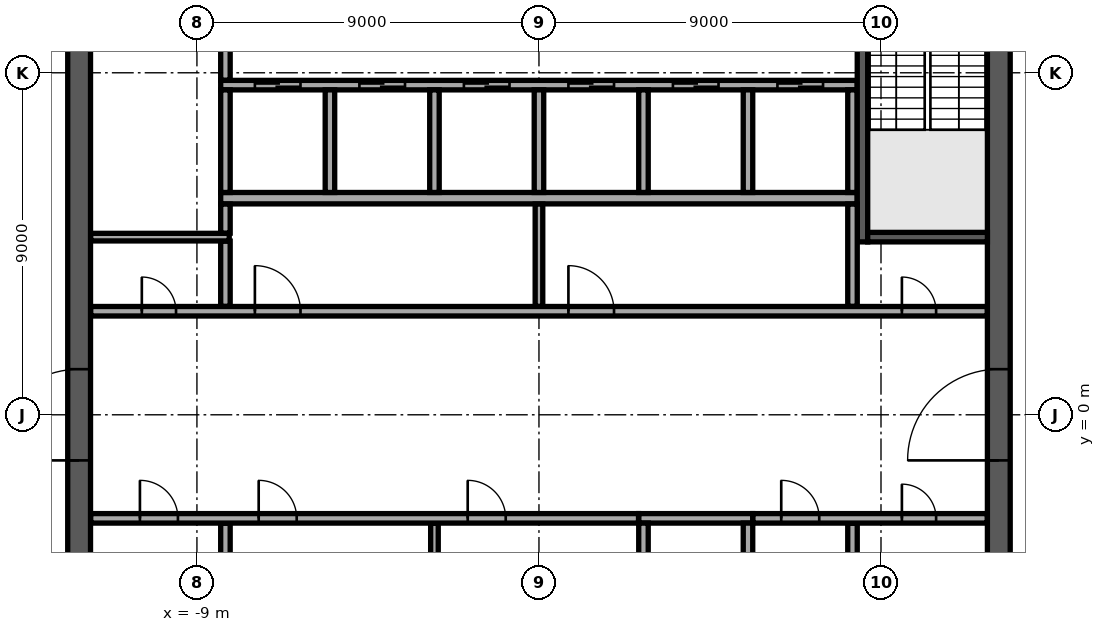
"""IFC4 building model, lengths in metres.
Left out: names, types, materials, properties, quantities, classifications, styles, units other than length and angle.
Written with IfcOpenShell. Run it as: python <this file> out.ifc"""

import sys

from ifc_helpers import new_model, si_unit, direction, frame, frame_2d, origin, place, context, subcontext, project, spatial, rectangle, extrude, element, fill, save


model = new_model("IFC4")
c1 = context("Model", 3, precision=1e-05, world=origin(), true_north=direction((0.0, 1.0)))
c2 = subcontext(c1, "Body", "Model", "MODEL_VIEW")
j1 = project(units=[si_unit("LENGTHUNIT", "METRE"), si_unit("PLANEANGLEUNIT", "RADIAN")], contexts=[c1])
p1 = place(None, origin())
s1 = spatial("IfcSite", under=j1, at=p1, CompositionType="ELEMENT")
p2 = place(p1, origin())
s2 = spatial("IfcBuilding", under=s1, at=p2, CompositionType="ELEMENT")
p3 = place(p2, frame((0.0, 0.0, 324.5)))
s3 = spatial("IfcBuildingStorey", under=s2, at=p3, CompositionType="ELEMENT", Elevation=324.5)
p4 = place(p3, frame((12.1, -11.8, 0.0), z_axis=(0.0, 0.0, 1.0), x_axis=(0.0, 1.0, 0.0)))
e1 = element("IfcWall", 1, at=p4, inside=s3, PredefinedType="SHEAR", context=c2, shape_type="SweptSolid", body=[
    extrude(rectangle(XDim=23.6, YDim=0.6, at=frame_2d((11.8, 0.0))), origin(), (0.0, 0.0, 1.0), 3.65),
])
p5 = place(p4, frame((10.6, 0.0, 0.0)))
e2 = element("IfcOpeningElement", 2, at=p5, cuts=e1, PredefinedType="OPENING", context=c2, shape_type="SweptSolid", body=[
    extrude(rectangle(XDim=2.4, YDim=2.4, at=frame_2d((1.2, 1.2))), frame((0.0, 0.31, 0.0), z_axis=(0.0, -1.0, 0.0), x_axis=(1.0, 0.0, 0.0)), (0.0, 0.0, 1.0), 0.62),
])
p6 = place(p3, frame((-12.1, -11.8, 0.0), z_axis=(0.0, 0.0, 1.0), x_axis=(0.0, 1.0, 0.0)))
e3 = element("IfcWall", 3, at=p6, inside=s3, PredefinedType="SHEAR", context=c2, shape_type="SweptSolid", body=[
    extrude(rectangle(XDim=23.6, YDim=0.6, at=frame_2d((11.8, 0.0))), origin(), (0.0, 0.0, 1.0), 3.65),
])
p7 = place(p6, frame((10.6, 0.0, 0.0)))
e4 = element("IfcOpeningElement", 4, at=p7, cuts=e3, PredefinedType="OPENING", context=c2, shape_type="SweptSolid", body=[
    extrude(rectangle(XDim=2.4, YDim=2.4, at=frame_2d((1.2, 1.2))), frame((0.0, 0.31, 0.0), z_axis=(0.0, -1.0, 0.0), x_axis=(1.0, 0.0, 0.0)), (0.0, 0.0, 1.0), 0.62),
])
p8 = place(p3, frame((-8.375, 5.7, 0.0), z_axis=(0.0, 0.0, 1.0), x_axis=(1.0, 0.0, 0.0)))
e5 = element("IfcWall", 5, at=p8, inside=s3, PredefinedType="SOLIDWALL", context=c2, shape_type="SweptSolid", body=[
    extrude(rectangle(XDim=16.75, YDim=0.3, at=frame_2d((8.375, 0.0))), origin(), (0.0, 0.0, 1.0), 3.65),
])
p9 = place(p3, frame((-8.375, 8.675, 0.0), z_axis=(0.0, 0.0, 1.0), x_axis=(1.0, 0.0, 0.0)))
e6 = element("IfcWall", 6, at=p9, inside=s3, PredefinedType="SOLIDWALL", context=c2, shape_type="SweptSolid", body=[
    extrude(rectangle(XDim=16.75, YDim=0.25, at=frame_2d((8.375, 0.0))), origin(), (0.0, 0.0, 1.0), 3.65),
])
p10 = place(p9, frame((0.9, 0.0, 0.0)))
e7 = element("IfcOpeningElement", 7, at=p10, cuts=e6, PredefinedType="OPENING", context=c2, shape_type="SweptSolid", body=[
    extrude(rectangle(XDim=1.2, YDim=2.1, at=frame_2d((0.6, 1.05))), frame((0.0, 0.135, 0.0), z_axis=(0.0, -1.0, 0.0), x_axis=(1.0, 0.0, 0.0)), (0.0, 0.0, 1.0), 0.27),
])
p11 = place(p9, frame((3.65, 0.0, 0.0)))
e8 = element("IfcOpeningElement", 8, at=p11, cuts=e6, PredefinedType="OPENING", context=c2, shape_type="SweptSolid", body=[
    extrude(rectangle(XDim=1.2, YDim=2.1, at=frame_2d((0.6, 1.05))), frame((0.0, 0.135, 0.0), z_axis=(0.0, -1.0, 0.0), x_axis=(1.0, 0.0, 0.0)), (0.0, 0.0, 1.0), 0.27),
])
p12 = place(p9, frame((6.4, 0.0, 0.0)))
e9 = element("IfcOpeningElement", 9, at=p12, cuts=e6, PredefinedType="OPENING", context=c2, shape_type="SweptSolid", body=[
    extrude(rectangle(XDim=1.2, YDim=2.1, at=frame_2d((0.6, 1.05))), frame((0.0, 0.135, 0.0), z_axis=(0.0, -1.0, 0.0), x_axis=(1.0, 0.0, 0.0)), (0.0, 0.0, 1.0), 0.27),
])
p13 = place(p9, frame((9.15, 0.0, 0.0)))
e10 = element("IfcOpeningElement", 10, at=p13, cuts=e6, PredefinedType="OPENING", context=c2, shape_type="SweptSolid", body=[
    extrude(rectangle(XDim=1.2, YDim=2.1, at=frame_2d((0.6, 1.05))), frame((0.0, 0.135, 0.0), z_axis=(0.0, -1.0, 0.0), x_axis=(1.0, 0.0, 0.0)), (0.0, 0.0, 1.0), 0.27),
])
p14 = place(p9, frame((11.9, 0.0, 0.0)))
e11 = element("IfcOpeningElement", 11, at=p14, cuts=e6, PredefinedType="OPENING", context=c2, shape_type="SweptSolid", body=[
    extrude(rectangle(XDim=1.2, YDim=2.1, at=frame_2d((0.6, 1.05))), frame((0.0, 0.135, 0.0), z_axis=(0.0, -1.0, 0.0), x_axis=(1.0, 0.0, 0.0)), (0.0, 0.0, 1.0), 0.27),
])
p15 = place(p9, frame((14.65, 0.0, 0.0)))
e12 = element("IfcOpeningElement", 12, at=p15, cuts=e6, PredefinedType="OPENING", context=c2, shape_type="SweptSolid", body=[
    extrude(rectangle(XDim=1.2, YDim=2.1, at=frame_2d((0.6, 1.05))), frame((0.0, 0.135, 0.0), z_axis=(0.0, -1.0, 0.0), x_axis=(1.0, 0.0, 0.0)), (0.0, 0.0, 1.0), 0.27),
])
for number, where, z_axis, x_axis in (
    (13, (-8.25, 5.85, 0.0), (0.0, 0.0, 1.0), (0.0, 1.0, 0.0)),
    (14, (-5.5, 5.85, 0.0), (0.0, 0.0, 1.0), (0.0, 1.0, 0.0)),
    (15, (-2.75, 5.85, 0.0), (0.0, 0.0, 1.0), (0.0, 1.0, 0.0)),
    (16, (0.0, 5.85, 0.0), (0.0, 0.0, 1.0), (0.0, 1.0, 0.0)),
    (17, (2.75, 5.85, 0.0), (0.0, 0.0, 1.0), (0.0, 1.0, 0.0)),
    (18, (5.5, 5.85, 0.0), (0.0, 0.0, 1.0), (0.0, 1.0, 0.0)),
    (19, (8.25, 5.85, 0.0), (0.0, 0.0, 1.0), (0.0, 1.0, 0.0)),
):
    element("IfcWall", number, at=place(p3, frame(where, z_axis=z_axis, x_axis=x_axis)), inside=s3, PredefinedType="SOLIDWALL", context=c2, shape_type="SweptSolid", body=[
        extrude(rectangle(XDim=2.7, YDim=0.25, at=frame_2d((1.35, 0.0))), origin(), (0.0, 0.0, 1.0), 3.65),
    ])
p16 = place(p3, frame((2.625, -2.725, 0.0), z_axis=(0.0, 0.0, 1.0), x_axis=(1.0, 0.0, 0.0)))
e20 = element("IfcWall", 20, at=p16, inside=s3, PredefinedType="SOLIDWALL", context=c2, shape_type="SweptSolid", body=[
    extrude(rectangle(XDim=3.0, YDim=0.25, at=frame_2d((1.5, 0.0))), origin(), (0.0, 0.0, 1.0), 3.65),
])
for number, where, z_axis, x_axis in (
    (21, (2.75, -5.55, 0.0), (0.0, 0.0, 1.0), (0.0, 1.0, 0.0)),
    (22, (5.5, -5.55, 0.0), (0.0, 0.0, 1.0), (0.0, 1.0, 0.0)),
):
    element("IfcWall", number, at=place(p3, frame(where, z_axis=z_axis, x_axis=x_axis)), inside=s3, PredefinedType="SOLIDWALL", context=c2, shape_type="SweptSolid", body=[
        extrude(rectangle(XDim=2.7, YDim=0.25, at=frame_2d((1.35, 0.0))), origin(), (0.0, 0.0, 1.0), 3.65),
    ])
p17 = place(p3, frame((8.512, 4.55, 0.0), z_axis=(0.0, 0.0, 1.0), x_axis=(0.0, 1.0, 0.0)))
e23 = element("IfcWall", 23, at=p17, inside=s3, PredefinedType="SOLIDWALL", context=c2, shape_type="SweptSolid", body=[
    extrude(rectangle(XDim=7.25, YDim=0.275, at=frame_2d((3.625, 0.0))), origin(), (0.0, 0.0, 1.0), 3.65),
])
p18 = place(p17, frame((6.0, 0.0, 0.0)))
e24 = element("IfcOpeningElement", 24, at=p18, cuts=e23, PredefinedType="OPENING", context=c2, shape_type="SweptSolid", body=[
    extrude(rectangle(XDim=1.0, YDim=2.1, at=frame_2d((0.5, 1.05))), frame((0.0, 0.147, 0.0), z_axis=(0.0, -1.0, 0.0), x_axis=(1.0, 0.0, 0.0)), (0.0, 0.0, 1.0), 0.295),
])
p19 = place(p3, frame((8.65, 4.675, 0.0), z_axis=(0.0, 0.0, 1.0), x_axis=(1.0, 0.0, 0.0)))
e25 = element("IfcWall", 25, at=p19, inside=s3, PredefinedType="SOLIDWALL", context=c2, shape_type="SweptSolid", body=[
    extrude(rectangle(XDim=3.15, YDim=0.25, at=frame_2d((1.575, 0.0))), origin(), (0.0, 0.0, 1.0), 3.65),
])
p20 = place(p3, frame((-8.25, -5.545, 0.0), z_axis=(0.0, 0.0, 1.0), x_axis=(0.0, 1.0, 0.0)))
e26 = element("IfcWall", 26, at=p20, inside=s3, PredefinedType="PARTITIONING", context=c2, shape_type="SweptSolid", body=[
    extrude(rectangle(XDim=2.69, YDim=0.25, at=frame_2d((1.345, 0.0))), origin(), (0.0, 0.0, 1.0), 3.65),
])
p21 = place(p3, frame((-2.75, -5.545, 0.0), z_axis=(0.0, 0.0, 1.0), x_axis=(0.0, 1.0, 0.0)))
e27 = element("IfcWall", 27, at=p21, inside=s3, PredefinedType="PARTITIONING", context=c2, shape_type="SweptSolid", body=[
    extrude(rectangle(XDim=2.69, YDim=0.2, at=frame_2d((1.345, 0.0))), origin(), (0.0, 0.0, 1.0), 3.65),
])
p22 = place(p3, frame((8.25, -5.545, 0.0), z_axis=(0.0, 0.0, 1.0), x_axis=(0.0, 1.0, 0.0)))
e28 = element("IfcWall", 28, at=p22, inside=s3, PredefinedType="PARTITIONING", context=c2, shape_type="SweptSolid", body=[
    extrude(rectangle(XDim=2.69, YDim=0.25, at=frame_2d((1.345, 0.0))), origin(), (0.0, 0.0, 1.0), 3.65),
])
p23 = place(p3, frame((-11.795, -2.725, 0.0), z_axis=(0.0, 0.0, 1.0), x_axis=(1.0, 0.0, 0.0)))
e29 = element("IfcWall", 29, at=p23, inside=s3, PredefinedType="PARTITIONING", context=c2, shape_type="SweptSolid", body=[
    extrude(rectangle(XDim=14.415, YDim=0.25, at=frame_2d((7.208, 0.0))), origin(), (0.0, 0.0, 1.0), 3.65),
])
p24 = place(p23, frame((1.295, 0.0, 0.0)))
e30 = element("IfcOpeningElement", 30, at=p24, cuts=e29, PredefinedType="OPENING", context=c2, shape_type="SweptSolid", body=[
    extrude(rectangle(XDim=1.0, YDim=2.1, at=frame_2d((0.5, 1.05))), frame((0.0, 0.135, 0.0), z_axis=(0.0, -1.0, 0.0), x_axis=(1.0, 0.0, 0.0)), (0.0, 0.0, 1.0), 0.27),
])
p25 = place(p23, frame((4.42, 0.0, 0.0)))
e31 = element("IfcOpeningElement", 31, at=p25, cuts=e29, PredefinedType="OPENING", context=c2, shape_type="SweptSolid", body=[
    extrude(rectangle(XDim=1.0, YDim=2.1, at=frame_2d((0.5, 1.05))), frame((0.0, 0.135, 0.0), z_axis=(0.0, -1.0, 0.0), x_axis=(1.0, 0.0, 0.0)), (0.0, 0.0, 1.0), 0.27),
])
p26 = place(p23, frame((9.92, 0.0, 0.0)))
e32 = element("IfcOpeningElement", 32, at=p26, cuts=e29, PredefinedType="OPENING", context=c2, shape_type="SweptSolid", body=[
    extrude(rectangle(XDim=1.0, YDim=2.1, at=frame_2d((0.5, 1.05))), frame((0.0, 0.135, 0.0), z_axis=(0.0, -1.0, 0.0), x_axis=(1.0, 0.0, 0.0)), (0.0, 0.0, 1.0), 0.27),
])
p27 = place(p3, frame((5.63, -2.725, 0.0), z_axis=(0.0, 0.0, 1.0), x_axis=(1.0, 0.0, 0.0)))
e33 = element("IfcWall", 33, at=p27, inside=s3, PredefinedType="PARTITIONING", context=c2, shape_type="SweptSolid", body=[
    extrude(rectangle(XDim=6.165, YDim=0.25, at=frame_2d((3.083, 0.0))), origin(), (0.0, 0.0, 1.0), 3.65),
])
p28 = place(p27, frame((0.745, 0.0, 0.0)))
e34 = element("IfcOpeningElement", 34, at=p28, cuts=e33, PredefinedType="OPENING", context=c2, shape_type="SweptSolid", body=[
    extrude(rectangle(XDim=1.0, YDim=2.1, at=frame_2d((0.5, 1.05))), frame((0.0, 0.135, 0.0), z_axis=(0.0, -1.0, 0.0), x_axis=(1.0, 0.0, 0.0)), (0.0, 0.0, 1.0), 0.27),
])
p29 = place(p27, frame((3.92, 0.0, 0.0)))
e35 = element("IfcOpeningElement", 35, at=p29, cuts=e33, PredefinedType="OPENING", context=c2, shape_type="SweptSolid", body=[
    extrude(rectangle(XDim=0.9, YDim=2.1, at=frame_2d((0.45, 1.05))), frame((0.0, 0.135, 0.0), z_axis=(0.0, -1.0, 0.0), x_axis=(1.0, 0.0, 0.0)), (0.0, 0.0, 1.0), 0.27),
])
p30 = place(p3, frame((-11.795, 2.725, 0.0), z_axis=(0.0, 0.0, 1.0), x_axis=(1.0, 0.0, 0.0)))
e36 = element("IfcWall", 36, at=p30, inside=s3, PredefinedType="PARTITIONING", context=c2, shape_type="SweptSolid", body=[
    extrude(rectangle(XDim=23.59, YDim=0.25, at=frame_2d((11.795, 0.0))), origin(), (0.0, 0.0, 1.0), 3.65),
])
p31 = place(p30, frame((21.345, 0.0, 0.0)))
e37 = element("IfcOpeningElement", 37, at=p31, cuts=e36, PredefinedType="OPENING", context=c2, shape_type="SweptSolid", body=[
    extrude(rectangle(XDim=0.9, YDim=2.1, at=frame_2d((0.45, 1.05))), frame((0.0, 0.135, 0.0), z_axis=(0.0, -1.0, 0.0), x_axis=(1.0, 0.0, 0.0)), (0.0, 0.0, 1.0), 0.27),
])
p32 = place(p30, frame((1.345, 0.0, 0.0)))
e38 = element("IfcOpeningElement", 38, at=p32, cuts=e36, PredefinedType="OPENING", context=c2, shape_type="SweptSolid", body=[
    extrude(rectangle(XDim=0.9, YDim=2.1, at=frame_2d((0.45, 1.05))), frame((0.0, 0.135, 0.0), z_axis=(0.0, -1.0, 0.0), x_axis=(1.0, 0.0, 0.0)), (0.0, 0.0, 1.0), 0.27),
])
p33 = place(p30, frame((4.32, 0.0, 0.0)))
e39 = element("IfcOpeningElement", 39, at=p33, cuts=e36, PredefinedType="OPENING", context=c2, shape_type="SweptSolid", body=[
    extrude(rectangle(XDim=1.2, YDim=2.1, at=frame_2d((0.6, 1.05))), frame((0.0, 0.135, 0.0), z_axis=(0.0, -1.0, 0.0), x_axis=(1.0, 0.0, 0.0)), (0.0, 0.0, 1.0), 0.27),
])
p34 = place(p30, frame((12.57, 0.0, 0.0)))
e40 = element("IfcOpeningElement", 40, at=p34, cuts=e36, PredefinedType="OPENING", context=c2, shape_type="SweptSolid", body=[
    extrude(rectangle(XDim=1.2, YDim=2.1, at=frame_2d((0.6, 1.05))), frame((0.0, 0.135, 0.0), z_axis=(0.0, -1.0, 0.0), x_axis=(1.0, 0.0, 0.0)), (0.0, 0.0, 1.0), 0.27),
])
p35 = place(p3, frame((-8.25, 2.855, 0.0), z_axis=(0.0, 0.0, 1.0), x_axis=(0.0, 1.0, 0.0)))
e41 = element("IfcWall", 41, at=p35, inside=s3, PredefinedType="PARTITIONING", context=c2, shape_type="SweptSolid", body=[
    extrude(rectangle(XDim=1.715, YDim=0.25, at=frame_2d((0.857, 0.0))), origin(), (0.0, 0.0, 1.0), 3.65),
])
p36 = place(p3, frame((0.0, 2.855, 0.0), z_axis=(0.0, 0.0, 1.0), x_axis=(0.0, 1.0, 0.0)))
e42 = element("IfcWall", 42, at=p36, inside=s3, PredefinedType="PARTITIONING", context=c2, shape_type="SweptSolid", body=[
    extrude(rectangle(XDim=2.69, YDim=0.2, at=frame_2d((1.345, 0.0))), origin(), (0.0, 0.0, 1.0), 3.65),
])
p37 = place(p3, frame((8.25, 2.855, 0.0), z_axis=(0.0, 0.0, 1.0), x_axis=(0.0, 1.0, 0.0)))
e43 = element("IfcWall", 43, at=p37, inside=s3, PredefinedType="PARTITIONING", context=c2, shape_type="SweptSolid", body=[
    extrude(rectangle(XDim=2.69, YDim=0.25, at=frame_2d((1.345, 0.0))), origin(), (0.0, 0.0, 1.0), 3.65),
])
p38 = place(p3, frame((-11.795, 4.675, 0.0), z_axis=(0.0, 0.0, 1.0), x_axis=(1.0, 0.0, 0.0)))
e44 = element("IfcWall", 44, at=p38, inside=s3, PredefinedType="PARTITIONING", context=c2, shape_type="SweptSolid", body=[
    extrude(rectangle(XDim=3.645, YDim=0.2, at=frame_2d((1.823, 0.0))), origin(), (0.0, 0.0, 1.0), 3.65),
])
p39 = place(p3, frame((-8.25, 4.78, 0.0), z_axis=(0.0, 0.0, 1.0), x_axis=(0.0, 1.0, 0.0)))
e45 = element("IfcWall", 45, at=p39, inside=s3, PredefinedType="PARTITIONING", context=c2, shape_type="SweptSolid", body=[
    extrude(rectangle(XDim=0.765, YDim=0.25, at=frame_2d((0.382, 0.0))), origin(), (0.0, 0.0, 1.0), 3.65),
])
p40 = place(p3, frame((-8.25, 8.805, 0.0), z_axis=(0.0, 0.0, 1.0), x_axis=(0.0, 1.0, 0.0)))
e46 = element("IfcWall", 46, at=p40, inside=s3, PredefinedType="PARTITIONING", context=c2, shape_type="SweptSolid", body=[
    extrude(rectangle(XDim=2.99, YDim=0.25, at=frame_2d((1.495, 0.0))), origin(), (0.0, 0.0, 1.0), 3.65),
])
p41 = place(p40, frame((0.895, 0.0, 0.0)))
e47 = element("IfcOpeningElement", 47, at=p41, cuts=e46, PredefinedType="OPENING", context=c2, shape_type="SweptSolid", body=[
    extrude(rectangle(XDim=1.0, YDim=2.1, at=frame_2d((0.5, 1.05))), frame((0.0, 0.135, 0.0), z_axis=(0.0, -1.0, 0.0), x_axis=(1.0, 0.0, 0.0)), (0.0, 0.0, 1.0), 0.27),
])
p42 = place(p5, origin())
e48 = element("IfcDoor", 48, at=p42, inside=s3, OperationType="SINGLE_SWING_LEFT", PredefinedType="DOOR", context=c2, shape_type="SweptSolid", body=[
    extrude(rectangle(XDim=2.4, YDim=2.4, at=frame_2d((1.2, 1.2))), frame((0.0, 0.025, 0.0), z_axis=(0.0, -1.0, 0.0), x_axis=(1.0, 0.0, 0.0)), (0.0, 0.0, 1.0), 0.05),
])
fill(e2, e48)
p43 = place(p7, origin())
e49 = element("IfcDoor", 49, at=p43, inside=s3, OperationType="SINGLE_SWING_LEFT", PredefinedType="DOOR", context=c2, shape_type="SweptSolid", body=[
    extrude(rectangle(XDim=2.4, YDim=2.4, at=frame_2d((1.2, 1.2))), frame((0.0, 0.025, 0.0), z_axis=(0.0, -1.0, 0.0), x_axis=(1.0, 0.0, 0.0)), (0.0, 0.0, 1.0), 0.05),
])
fill(e4, e49)
p44 = place(p10, origin())
e50 = element("IfcDoor", 50, at=p44, inside=s3, OperationType="DOUBLE_DOOR_SLIDING", PredefinedType="DOOR", context=c2, shape_type="SweptSolid", body=[
    extrude(rectangle(XDim=1.2, YDim=2.1, at=frame_2d((0.6, 1.05))), frame((0.0, 0.025, 0.0), z_axis=(0.0, -1.0, 0.0), x_axis=(1.0, 0.0, 0.0)), (0.0, 0.0, 1.0), 0.05),
])
fill(e7, e50)
p45 = place(p11, origin())
e51 = element("IfcDoor", 51, at=p45, inside=s3, OperationType="DOUBLE_DOOR_SLIDING", PredefinedType="DOOR", context=c2, shape_type="SweptSolid", body=[
    extrude(rectangle(XDim=1.2, YDim=2.1, at=frame_2d((0.6, 1.05))), frame((0.0, 0.025, 0.0), z_axis=(0.0, -1.0, 0.0), x_axis=(1.0, 0.0, 0.0)), (0.0, 0.0, 1.0), 0.05),
])
fill(e8, e51)
p46 = place(p12, origin())
e52 = element("IfcDoor", 52, at=p46, inside=s3, OperationType="DOUBLE_DOOR_SLIDING", PredefinedType="DOOR", context=c2, shape_type="SweptSolid", body=[
    extrude(rectangle(XDim=1.2, YDim=2.1, at=frame_2d((0.6, 1.05))), frame((0.0, 0.025, 0.0), z_axis=(0.0, -1.0, 0.0), x_axis=(1.0, 0.0, 0.0)), (0.0, 0.0, 1.0), 0.05),
])
fill(e9, e52)
p47 = place(p13, origin())
e53 = element("IfcDoor", 53, at=p47, inside=s3, OperationType="DOUBLE_DOOR_SLIDING", PredefinedType="DOOR", context=c2, shape_type="SweptSolid", body=[
    extrude(rectangle(XDim=1.2, YDim=2.1, at=frame_2d((0.6, 1.05))), frame((0.0, 0.025, 0.0), z_axis=(0.0, -1.0, 0.0), x_axis=(1.0, 0.0, 0.0)), (0.0, 0.0, 1.0), 0.05),
])
fill(e10, e53)
p48 = place(p14, origin())
e54 = element("IfcDoor", 54, at=p48, inside=s3, OperationType="DOUBLE_DOOR_SLIDING", PredefinedType="DOOR", context=c2, shape_type="SweptSolid", body=[
    extrude(rectangle(XDim=1.2, YDim=2.1, at=frame_2d((0.6, 1.05))), frame((0.0, 0.025, 0.0), z_axis=(0.0, -1.0, 0.0), x_axis=(1.0, 0.0, 0.0)), (0.0, 0.0, 1.0), 0.05),
])
fill(e11, e54)
p49 = place(p15, origin())
e55 = element("IfcDoor", 55, at=p49, inside=s3, OperationType="DOUBLE_DOOR_SLIDING", PredefinedType="DOOR", context=c2, shape_type="SweptSolid", body=[
    extrude(rectangle(XDim=1.2, YDim=2.1, at=frame_2d((0.6, 1.05))), frame((0.0, 0.025, 0.0), z_axis=(0.0, -1.0, 0.0), x_axis=(1.0, 0.0, 0.0)), (0.0, 0.0, 1.0), 0.05),
])
fill(e12, e55)
p50 = place(p24, origin())
e56 = element("IfcDoor", 56, at=p50, inside=s3, OperationType="SINGLE_SWING_RIGHT", PredefinedType="DOOR", context=c2, shape_type="SweptSolid", body=[
    extrude(rectangle(XDim=1.0, YDim=2.1, at=frame_2d((0.5, 1.05))), frame((0.0, 0.025, 0.0), z_axis=(0.0, -1.0, 0.0), x_axis=(1.0, 0.0, 0.0)), (0.0, 0.0, 1.0), 0.05),
])
fill(e30, e56)
p51 = place(p28, origin())
e57 = element("IfcDoor", 57, at=p51, inside=s3, OperationType="SINGLE_SWING_RIGHT", PredefinedType="DOOR", context=c2, shape_type="SweptSolid", body=[
    extrude(rectangle(XDim=1.0, YDim=2.1, at=frame_2d((0.5, 1.05))), frame((0.0, 0.025, 0.0), z_axis=(0.0, -1.0, 0.0), x_axis=(1.0, 0.0, 0.0)), (0.0, 0.0, 1.0), 0.05),
])
fill(e34, e57)
p52 = place(p31, origin())
e58 = element("IfcDoor", 58, at=p52, inside=s3, OperationType="SINGLE_SWING_RIGHT", PredefinedType="DOOR", context=c2, shape_type="SweptSolid", body=[
    extrude(rectangle(XDim=0.9, YDim=2.1, at=frame_2d((0.45, 1.05))), frame((0.0, 0.025, 0.0), z_axis=(0.0, -1.0, 0.0), x_axis=(1.0, 0.0, 0.0)), (0.0, 0.0, 1.0), 0.05),
])
fill(e37, e58)
p53 = place(p29, origin())
e59 = element("IfcDoor", 59, at=p53, inside=s3, OperationType="SINGLE_SWING_RIGHT", PredefinedType="DOOR", context=c2, shape_type="SweptSolid", body=[
    extrude(rectangle(XDim=0.9, YDim=2.1, at=frame_2d((0.45, 1.05))), frame((0.0, 0.025, 0.0), z_axis=(0.0, -1.0, 0.0), x_axis=(1.0, 0.0, 0.0)), (0.0, 0.0, 1.0), 0.05),
])
fill(e35, e59)
p54 = place(p32, origin())
e60 = element("IfcDoor", 60, at=p54, inside=s3, OperationType="SINGLE_SWING_RIGHT", PredefinedType="DOOR", context=c2, shape_type="SweptSolid", body=[
    extrude(rectangle(XDim=0.9, YDim=2.1, at=frame_2d((0.45, 1.05))), frame((0.0, 0.025, 0.0), z_axis=(0.0, -1.0, 0.0), x_axis=(1.0, 0.0, 0.0)), (0.0, 0.0, 1.0), 0.05),
])
fill(e38, e60)
p55 = place(p33, origin())
e61 = element("IfcDoor", 61, at=p55, inside=s3, OperationType="SINGLE_SWING_LEFT", PredefinedType="DOOR", context=c2, shape_type="SweptSolid", body=[
    extrude(rectangle(XDim=1.2, YDim=2.1, at=frame_2d((0.6, 1.05))), frame((0.0, 0.025, 0.0), z_axis=(0.0, -1.0, 0.0), x_axis=(1.0, 0.0, 0.0)), (0.0, 0.0, 1.0), 0.05),
])
fill(e39, e61)
p56 = place(p34, origin())
e62 = element("IfcDoor", 62, at=p56, inside=s3, OperationType="SINGLE_SWING_LEFT", PredefinedType="DOOR", context=c2, shape_type="SweptSolid", body=[
    extrude(rectangle(XDim=1.2, YDim=2.1, at=frame_2d((0.6, 1.05))), frame((0.0, 0.025, 0.0), z_axis=(0.0, -1.0, 0.0), x_axis=(1.0, 0.0, 0.0)), (0.0, 0.0, 1.0), 0.05),
])
fill(e40, e62)
p57 = place(p25, origin())
e63 = element("IfcDoor", 63, at=p57, inside=s3, OperationType="SINGLE_SWING_RIGHT", PredefinedType="DOOR", context=c2, shape_type="SweptSolid", body=[
    extrude(rectangle(XDim=1.0, YDim=2.1, at=frame_2d((0.5, 1.05))), frame((0.0, 0.025, 0.0), z_axis=(0.0, -1.0, 0.0), x_axis=(1.0, 0.0, 0.0)), (0.0, 0.0, 1.0), 0.05),
])
fill(e31, e63)
p58 = place(p26, origin())
e64 = element("IfcDoor", 64, at=p58, inside=s3, OperationType="SINGLE_SWING_RIGHT", PredefinedType="DOOR", context=c2, shape_type="SweptSolid", body=[
    extrude(rectangle(XDim=1.0, YDim=2.1, at=frame_2d((0.5, 1.05))), frame((0.0, 0.025, 0.0), z_axis=(0.0, -1.0, 0.0), x_axis=(1.0, 0.0, 0.0)), (0.0, 0.0, 1.0), 0.05),
])
fill(e32, e64)
save(model, sys.argv[1])
